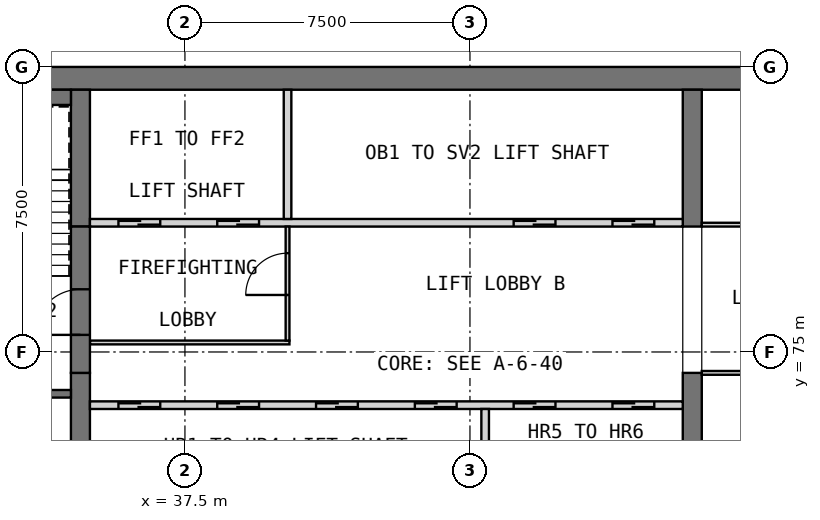
"""IFC4 building model, lengths in metres.
Left out: names, types, materials, properties, quantities, classifications, styles, units other than length and angle.
Written with IfcOpenShell. Run it as: python <this file> out.ifc"""

import sys

from ifc_helpers import new_model, si_unit, direction, frame, frame_2d, origin, place, context, subcontext, project, spatial, rectangle, extrude, element, fill, save


model = new_model("IFC4")
c1 = context("Model", 3, precision=1e-05, world=origin(), true_north=direction((0.0, 1.0)))
c2 = subcontext(c1, "Body", "Model", "MODEL_VIEW")
j1 = project(units=[si_unit("LENGTHUNIT", "METRE"), si_unit("PLANEANGLEUNIT", "RADIAN")], contexts=[c1])
p1 = place(None, origin())
s1 = spatial("IfcSite", under=j1, at=p1, CompositionType="ELEMENT")
p2 = place(p1, origin())
s2 = spatial("IfcBuilding", under=s1, at=p2, CompositionType="ELEMENT")
p3 = place(p2, frame((0.0, 0.0, 273.2)))
s3 = spatial("IfcBuildingStorey", under=s2, at=p3, CompositionType="ELEMENT", Elevation=273.2)
p4 = place(p3, frame((30.0, 82.2, 0.0), z_axis=(0.0, 0.0, 1.0), x_axis=(1.0, 0.0, 0.0)))
e1 = element("IfcWall", 1, at=p4, inside=s3, PredefinedType="SHEAR", context=c2, shape_type="SweptSolid", body=[
    extrude(rectangle(XDim=30.0, YDim=0.6, at=frame_2d((15.0, 0.0))), origin(), (0.0, 0.0, 1.0), 3.5),
])
p5 = place(p3, frame((34.75, 68.05, 0.0), z_axis=(0.0, 0.0, 1.0), x_axis=(0.0, 1.0, 0.0)))
e2 = element("IfcWall", 2, at=p5, inside=s3, PredefinedType="SHEAR", context=c2, shape_type="SweptSolid", body=[
    extrude(rectangle(XDim=6.4, YDim=0.5, at=frame_2d((3.2, 0.0))), origin(), (0.0, 0.0, 1.0), 3.5),
])
p6 = place(p3, frame((34.75, 78.3, 0.0), z_axis=(0.0, 0.0, 1.0), x_axis=(0.0, 1.0, 0.0)))
e3 = element("IfcWall", 3, at=p6, inside=s3, PredefinedType="SHEAR", context=c2, shape_type="SweptSolid", body=[
    extrude(rectangle(XDim=3.6, YDim=0.5, at=frame_2d((1.8, 0.0))), origin(), (0.0, 0.0, 1.0), 3.5),
])
p7 = place(p3, frame((50.85, 68.05, 0.0), z_axis=(0.0, 0.0, 1.0), x_axis=(0.0, 1.0, 0.0)))
e4 = element("IfcWall", 4, at=p7, inside=s3, PredefinedType="SHEAR", context=c2, shape_type="SweptSolid", body=[
    extrude(rectangle(XDim=6.4, YDim=0.5, at=frame_2d((3.2, 0.0))), origin(), (0.0, 0.0, 1.0), 3.5),
])
p8 = place(p3, frame((50.85, 78.3, 0.0), z_axis=(0.0, 0.0, 1.0), x_axis=(0.0, 1.0, 0.0)))
e5 = element("IfcWall", 5, at=p8, inside=s3, PredefinedType="SHEAR", context=c2, shape_type="SweptSolid", body=[
    extrude(rectangle(XDim=3.6, YDim=0.5, at=frame_2d((1.8, 0.0))), origin(), (0.0, 0.0, 1.0), 3.5),
])
p9 = place(p3, frame((35.0, 73.6, 0.0), z_axis=(0.0, 0.0, 1.0), x_axis=(1.0, 0.0, 0.0)))
e6 = element("IfcWall", 6, at=p9, inside=s3, PredefinedType="SOLIDWALL", context=c2, shape_type="SweptSolid", body=[
    extrude(rectangle(XDim=15.6, YDim=0.2, at=frame_2d((7.8, 0.0))), origin(), (0.0, 0.0, 1.0), 3.5),
])
p10 = place(p9, frame((0.75, 0.0, 0.0)))
e7 = element("IfcOpeningElement", 7, at=p10, cuts=e6, PredefinedType="OPENING", context=c2, shape_type="SweptSolid", body=[
    extrude(rectangle(XDim=1.1, YDim=2.1, at=frame_2d((0.55, 1.05))), frame((0.0, 0.11, 0.0), z_axis=(0.0, -1.0, 0.0), x_axis=(1.0, 0.0, 0.0)), (0.0, 0.0, 1.0), 0.22),
])
p11 = place(p9, frame((3.35, 0.0, 0.0)))
e8 = element("IfcOpeningElement", 8, at=p11, cuts=e6, PredefinedType="OPENING", context=c2, shape_type="SweptSolid", body=[
    extrude(rectangle(XDim=1.1, YDim=2.1, at=frame_2d((0.55, 1.05))), frame((0.0, 0.11, 0.0), z_axis=(0.0, -1.0, 0.0), x_axis=(1.0, 0.0, 0.0)), (0.0, 0.0, 1.0), 0.22),
])
p12 = place(p9, frame((5.95, 0.0, 0.0)))
e9 = element("IfcOpeningElement", 9, at=p12, cuts=e6, PredefinedType="OPENING", context=c2, shape_type="SweptSolid", body=[
    extrude(rectangle(XDim=1.1, YDim=2.1, at=frame_2d((0.55, 1.05))), frame((0.0, 0.11, 0.0), z_axis=(0.0, -1.0, 0.0), x_axis=(1.0, 0.0, 0.0)), (0.0, 0.0, 1.0), 0.22),
])
p13 = place(p9, frame((8.55, 0.0, 0.0)))
e10 = element("IfcOpeningElement", 10, at=p13, cuts=e6, PredefinedType="OPENING", context=c2, shape_type="SweptSolid", body=[
    extrude(rectangle(XDim=1.1, YDim=2.1, at=frame_2d((0.55, 1.05))), frame((0.0, 0.11, 0.0), z_axis=(0.0, -1.0, 0.0), x_axis=(1.0, 0.0, 0.0)), (0.0, 0.0, 1.0), 0.22),
])
p14 = place(p9, frame((11.15, 0.0, 0.0)))
e11 = element("IfcOpeningElement", 11, at=p14, cuts=e6, PredefinedType="OPENING", context=c2, shape_type="SweptSolid", body=[
    extrude(rectangle(XDim=1.1, YDim=2.1, at=frame_2d((0.55, 1.05))), frame((0.0, 0.11, 0.0), z_axis=(0.0, -1.0, 0.0), x_axis=(1.0, 0.0, 0.0)), (0.0, 0.0, 1.0), 0.22),
])
p15 = place(p9, frame((13.75, 0.0, 0.0)))
e12 = element("IfcOpeningElement", 12, at=p15, cuts=e6, PredefinedType="OPENING", context=c2, shape_type="SweptSolid", body=[
    extrude(rectangle(XDim=1.1, YDim=2.1, at=frame_2d((0.55, 1.05))), frame((0.0, 0.11, 0.0), z_axis=(0.0, -1.0, 0.0), x_axis=(1.0, 0.0, 0.0)), (0.0, 0.0, 1.0), 0.22),
])
p16 = place(p3, frame((45.4, 71.5, 0.0), z_axis=(0.0, 0.0, 1.0), x_axis=(0.0, 1.0, 0.0)))
e13 = element("IfcWall", 13, at=p16, inside=s3, PredefinedType="SOLIDWALL", context=c2, shape_type="SweptSolid", body=[
    extrude(rectangle(XDim=2.0, YDim=0.2, at=frame_2d((1.0, 0.0))), origin(), (0.0, 0.0, 1.0), 3.5),
])
p17 = place(p3, frame((35.0, 78.4, 0.0), z_axis=(0.0, 0.0, 1.0), x_axis=(1.0, 0.0, 0.0)))
e14 = element("IfcWall", 14, at=p17, inside=s3, PredefinedType="SOLIDWALL", context=c2, shape_type="SweptSolid", body=[
    extrude(rectangle(XDim=15.6, YDim=0.2, at=frame_2d((7.8, 0.0))), origin(), (0.0, 0.0, 1.0), 3.5),
])
p18 = place(p17, frame((0.75, 0.0, 0.0)))
e15 = element("IfcOpeningElement", 15, at=p18, cuts=e14, PredefinedType="OPENING", context=c2, shape_type="SweptSolid", body=[
    extrude(rectangle(XDim=1.1, YDim=2.1, at=frame_2d((0.55, 1.05))), frame((0.0, 0.11, 0.0), z_axis=(0.0, -1.0, 0.0), x_axis=(1.0, 0.0, 0.0)), (0.0, 0.0, 1.0), 0.22),
])
p19 = place(p17, frame((3.35, 0.0, 0.0)))
e16 = element("IfcOpeningElement", 16, at=p19, cuts=e14, PredefinedType="OPENING", context=c2, shape_type="SweptSolid", body=[
    extrude(rectangle(XDim=1.1, YDim=2.1, at=frame_2d((0.55, 1.05))), frame((0.0, 0.11, 0.0), z_axis=(0.0, -1.0, 0.0), x_axis=(1.0, 0.0, 0.0)), (0.0, 0.0, 1.0), 0.22),
])
p20 = place(p17, frame((11.15, 0.0, 0.0)))
e17 = element("IfcOpeningElement", 17, at=p20, cuts=e14, PredefinedType="OPENING", context=c2, shape_type="SweptSolid", body=[
    extrude(rectangle(XDim=1.1, YDim=2.1, at=frame_2d((0.55, 1.05))), frame((0.0, 0.11, 0.0), z_axis=(0.0, -1.0, 0.0), x_axis=(1.0, 0.0, 0.0)), (0.0, 0.0, 1.0), 0.22),
])
p21 = place(p17, frame((13.75, 0.0, 0.0)))
e18 = element("IfcOpeningElement", 18, at=p21, cuts=e14, PredefinedType="OPENING", context=c2, shape_type="SweptSolid", body=[
    extrude(rectangle(XDim=1.1, YDim=2.1, at=frame_2d((0.55, 1.05))), frame((0.0, 0.11, 0.0), z_axis=(0.0, -1.0, 0.0), x_axis=(1.0, 0.0, 0.0)), (0.0, 0.0, 1.0), 0.22),
])
p22 = place(p3, frame((40.2, 78.5, 0.0), z_axis=(0.0, 0.0, 1.0), x_axis=(0.0, 1.0, 0.0)))
e19 = element("IfcWall", 19, at=p22, inside=s3, PredefinedType="SOLIDWALL", context=c2, shape_type="SweptSolid", body=[
    extrude(rectangle(XDim=3.4, YDim=0.2, at=frame_2d((1.7, 0.0))), origin(), (0.0, 0.0, 1.0), 3.5),
])
p23 = place(p3, frame((35.0, 75.25, 0.0), z_axis=(0.0, 0.0, 1.0), x_axis=(1.0, 0.0, 0.0)))
e20 = element("IfcWall", 20, at=p23, inside=s3, PredefinedType="PARTITIONING", context=c2, shape_type="SweptSolid", body=[
    extrude(rectangle(XDim=5.25, YDim=0.1, at=frame_2d((2.625, 0.0))), origin(), (0.0, 0.0, 1.0), 3.25),
])
p24 = place(p3, frame((40.2, 75.3, 0.0), z_axis=(0.0, 0.0, 1.0), x_axis=(0.0, 1.0, 0.0)))
e21 = element("IfcWall", 21, at=p24, inside=s3, PredefinedType="PARTITIONING", context=c2, shape_type="SweptSolid", body=[
    extrude(rectangle(XDim=3.0, YDim=0.1, at=frame_2d((1.5, 0.0))), origin(), (0.0, 0.0, 1.0), 3.25),
])
p25 = place(p24, frame((1.2, 0.0, 0.0)))
e22 = element("IfcOpeningElement", 22, at=p25, cuts=e21, PredefinedType="OPENING", context=c2, shape_type="SweptSolid", body=[
    extrude(rectangle(XDim=1.1, YDim=2.1, at=frame_2d((0.55, 1.05))), frame((0.0, 0.06, 0.0), z_axis=(0.0, -1.0, 0.0), x_axis=(1.0, 0.0, 0.0)), (0.0, 0.0, 1.0), 0.12),
])
p26 = place(p3, frame((34.75, 74.45, 0.0), z_axis=(0.0, 0.0, 1.0), x_axis=(0.0, 1.0, 0.0)))
e23 = element("IfcWall", 23, at=p26, inside=s3, PredefinedType="SOLIDWALL", context=c2, shape_type="SweptSolid", body=[
    extrude(rectangle(XDim=3.85, YDim=0.5, at=frame_2d((1.925, 0.0))), origin(), (0.0, 0.0, 1.0), 2.3),
])
p27 = place(p26, frame((1.0, 0.0, 0.0)))
e24 = element("IfcOpeningElement", 24, at=p27, cuts=e23, PredefinedType="OPENING", context=c2, shape_type="SweptSolid", body=[
    extrude(rectangle(XDim=1.2, YDim=2.1, at=frame_2d((0.6, 1.05))), frame((0.0, 0.26, 0.0), z_axis=(0.0, -1.0, 0.0), x_axis=(1.0, 0.0, 0.0)), (0.0, 0.0, 1.0), 0.52),
])
p28 = place(p3, frame((30.6, 73.9, 0.0), z_axis=(0.0, 0.0, 1.0), x_axis=(1.0, 0.0, 0.0)))
e25 = element("IfcWall", 25, at=p28, inside=s3, PredefinedType="SOLIDWALL", context=c2, shape_type="SweptSolid", body=[
    extrude(rectangle(XDim=3.9, YDim=0.2, at=frame_2d((1.95, 0.0))), origin(), (0.0, 0.0, 1.0), 3.25),
])
p29 = place(p28, frame((1.7, 0.0, 0.0)))
e26 = element("IfcOpeningElement", 26, at=p29, cuts=e25, PredefinedType="OPENING", context=c2, shape_type="SweptSolid", body=[
    extrude(rectangle(XDim=0.9, YDim=2.1, at=frame_2d((0.45, 1.05))), frame((0.0, 0.11, 0.0), z_axis=(0.0, -1.0, 0.0), x_axis=(1.0, 0.0, 0.0)), (0.0, 0.0, 1.0), 0.22),
])
p30 = place(p3, frame((31.0, 81.7, 0.0), z_axis=(0.0, 0.0, 1.0), x_axis=(1.0, 0.0, 0.0)))
e27 = element("IfcWall", 27, at=p30, inside=s3, PredefinedType="SOLIDWALL", context=c2, shape_type="SweptSolid", body=[
    extrude(rectangle(XDim=3.5, YDim=0.4, at=frame_2d((1.75, 0.0))), origin(), (0.0, 0.0, 1.0), 3.25),
])
p31 = place(p3, frame((51.1, 74.45, 0.0), z_axis=(0.0, 0.0, 1.0), x_axis=(1.0, 0.0, 0.0)))
e28 = element("IfcWall", 28, at=p31, inside=s3, PredefinedType="PARTITIONING", context=c2, shape_type="SweptSolid", body=[
    extrude(rectangle(XDim=8.3, YDim=0.1, at=frame_2d((4.15, 0.0))), origin(), (0.0, 0.0, 1.0), 3.25),
])
p32 = place(p31, frame((3.7, 0.0, 0.0)))
e29 = element("IfcOpeningElement", 29, at=p32, cuts=e28, PredefinedType="OPENING", context=c2, shape_type="SweptSolid", body=[
    extrude(rectangle(XDim=0.9, YDim=2.1, at=frame_2d((0.45, 1.05))), frame((0.0, 0.06, 0.0), z_axis=(0.0, -1.0, 0.0), x_axis=(1.0, 0.0, 0.0)), (0.0, 0.0, 1.0), 0.12),
])
p33 = place(p3, frame((51.1, 78.35, 0.0), z_axis=(0.0, 0.0, 1.0), x_axis=(1.0, 0.0, 0.0)))
e30 = element("IfcWall", 30, at=p33, inside=s3, PredefinedType="PARTITIONING", context=c2, shape_type="SweptSolid", body=[
    extrude(rectangle(XDim=8.3, YDim=0.1, at=frame_2d((4.15, 0.0))), origin(), (0.0, 0.0, 1.0), 3.25),
])
p34 = place(p33, frame((3.7, 0.0, 0.0)))
e31 = element("IfcOpeningElement", 31, at=p34, cuts=e30, PredefinedType="OPENING", context=c2, shape_type="SweptSolid", body=[
    extrude(rectangle(XDim=0.9, YDim=2.1, at=frame_2d((0.45, 1.05))), frame((0.0, 0.06, 0.0), z_axis=(0.0, -1.0, 0.0), x_axis=(1.0, 0.0, 0.0)), (0.0, 0.0, 1.0), 0.12),
])
p35 = place(p10, origin())
e32 = element("IfcDoor", 32, at=p35, inside=s3, OperationType="DOUBLE_DOOR_SLIDING", PredefinedType="DOOR", context=c2, shape_type="SweptSolid", body=[
    extrude(rectangle(XDim=1.1, YDim=2.1, at=frame_2d((0.55, 1.05))), frame((0.0, 0.025, 0.0), z_axis=(0.0, -1.0, 0.0), x_axis=(1.0, 0.0, 0.0)), (0.0, 0.0, 1.0), 0.05),
])
fill(e7, e32)
p36 = place(p11, origin())
e33 = element("IfcDoor", 33, at=p36, inside=s3, OperationType="DOUBLE_DOOR_SLIDING", PredefinedType="DOOR", context=c2, shape_type="SweptSolid", body=[
    extrude(rectangle(XDim=1.1, YDim=2.1, at=frame_2d((0.55, 1.05))), frame((0.0, 0.025, 0.0), z_axis=(0.0, -1.0, 0.0), x_axis=(1.0, 0.0, 0.0)), (0.0, 0.0, 1.0), 0.05),
])
fill(e8, e33)
p37 = place(p12, origin())
e34 = element("IfcDoor", 34, at=p37, inside=s3, OperationType="DOUBLE_DOOR_SLIDING", PredefinedType="DOOR", context=c2, shape_type="SweptSolid", body=[
    extrude(rectangle(XDim=1.1, YDim=2.1, at=frame_2d((0.55, 1.05))), frame((0.0, 0.025, 0.0), z_axis=(0.0, -1.0, 0.0), x_axis=(1.0, 0.0, 0.0)), (0.0, 0.0, 1.0), 0.05),
])
fill(e9, e34)
p38 = place(p13, origin())
e35 = element("IfcDoor", 35, at=p38, inside=s3, OperationType="DOUBLE_DOOR_SLIDING", PredefinedType="DOOR", context=c2, shape_type="SweptSolid", body=[
    extrude(rectangle(XDim=1.1, YDim=2.1, at=frame_2d((0.55, 1.05))), frame((0.0, 0.025, 0.0), z_axis=(0.0, -1.0, 0.0), x_axis=(1.0, 0.0, 0.0)), (0.0, 0.0, 1.0), 0.05),
])
fill(e10, e35)
p39 = place(p14, origin())
e36 = element("IfcDoor", 36, at=p39, inside=s3, OperationType="DOUBLE_DOOR_SLIDING", PredefinedType="DOOR", context=c2, shape_type="SweptSolid", body=[
    extrude(rectangle(XDim=1.1, YDim=2.1, at=frame_2d((0.55, 1.05))), frame((0.0, 0.025, 0.0), z_axis=(0.0, -1.0, 0.0), x_axis=(1.0, 0.0, 0.0)), (0.0, 0.0, 1.0), 0.05),
])
fill(e11, e36)
p40 = place(p15, origin())
e37 = element("IfcDoor", 37, at=p40, inside=s3, OperationType="DOUBLE_DOOR_SLIDING", PredefinedType="DOOR", context=c2, shape_type="SweptSolid", body=[
    extrude(rectangle(XDim=1.1, YDim=2.1, at=frame_2d((0.55, 1.05))), frame((0.0, 0.025, 0.0), z_axis=(0.0, -1.0, 0.0), x_axis=(1.0, 0.0, 0.0)), (0.0, 0.0, 1.0), 0.05),
])
fill(e12, e37)
p41 = place(p18, origin())
e38 = element("IfcDoor", 38, at=p41, inside=s3, OperationType="DOUBLE_DOOR_SLIDING", PredefinedType="DOOR", context=c2, shape_type="SweptSolid", body=[
    extrude(rectangle(XDim=1.1, YDim=2.1, at=frame_2d((0.55, 1.05))), frame((0.0, 0.025, 0.0), z_axis=(0.0, -1.0, 0.0), x_axis=(1.0, 0.0, 0.0)), (0.0, 0.0, 1.0), 0.05),
])
fill(e15, e38)
p42 = place(p19, origin())
e39 = element("IfcDoor", 39, at=p42, inside=s3, OperationType="DOUBLE_DOOR_SLIDING", PredefinedType="DOOR", context=c2, shape_type="SweptSolid", body=[
    extrude(rectangle(XDim=1.1, YDim=2.1, at=frame_2d((0.55, 1.05))), frame((0.0, 0.025, 0.0), z_axis=(0.0, -1.0, 0.0), x_axis=(1.0, 0.0, 0.0)), (0.0, 0.0, 1.0), 0.05),
])
fill(e16, e39)
p43 = place(p20, origin())
e40 = element("IfcDoor", 40, at=p43, inside=s3, OperationType="DOUBLE_DOOR_SLIDING", PredefinedType="DOOR", context=c2, shape_type="SweptSolid", body=[
    extrude(rectangle(XDim=1.1, YDim=2.1, at=frame_2d((0.55, 1.05))), frame((0.0, 0.025, 0.0), z_axis=(0.0, -1.0, 0.0), x_axis=(1.0, 0.0, 0.0)), (0.0, 0.0, 1.0), 0.05),
])
fill(e17, e40)
p44 = place(p21, origin())
e41 = element("IfcDoor", 41, at=p44, inside=s3, OperationType="DOUBLE_DOOR_SLIDING", PredefinedType="DOOR", context=c2, shape_type="SweptSolid", body=[
    extrude(rectangle(XDim=1.1, YDim=2.1, at=frame_2d((0.55, 1.05))), frame((0.0, 0.025, 0.0), z_axis=(0.0, -1.0, 0.0), x_axis=(1.0, 0.0, 0.0)), (0.0, 0.0, 1.0), 0.05),
])
fill(e18, e41)
p45 = place(p25, origin())
e42 = element("IfcDoor", 42, at=p45, inside=s3, OperationType="SINGLE_SWING_LEFT", PredefinedType="DOOR", context=c2, shape_type="SweptSolid", body=[
    extrude(rectangle(XDim=1.1, YDim=2.1, at=frame_2d((0.55, 1.05))), frame((0.0, 0.025, 0.0), z_axis=(0.0, -1.0, 0.0), x_axis=(1.0, 0.0, 0.0)), (0.0, 0.0, 1.0), 0.05),
])
fill(e22, e42)
p46 = place(p27, origin())
e43 = element("IfcDoor", 43, at=p46, inside=s3, OperationType="SINGLE_SWING_RIGHT", PredefinedType="DOOR", context=c2, shape_type="SweptSolid", body=[
    extrude(rectangle(XDim=1.2, YDim=2.1, at=frame_2d((0.6, 1.05))), frame((0.0, 0.025, 0.0), z_axis=(0.0, -1.0, 0.0), x_axis=(1.0, 0.0, 0.0)), (0.0, 0.0, 1.0), 0.05),
])
fill(e24, e43)
save(model, sys.argv[1])
